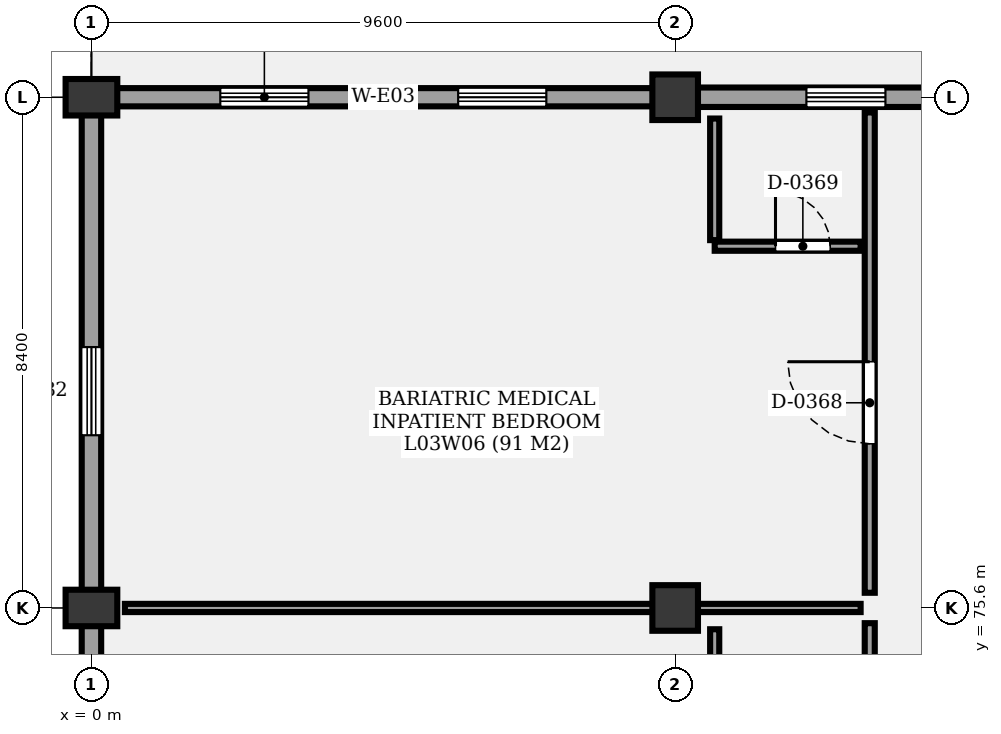
"""IFC4 building model, lengths in metres.
Left out: names, types, materials, properties, quantities, classifications, styles, units other than length and angle.
Written with IfcOpenShell. Run it as: python <this file> out.ifc"""

import sys

from ifc_helpers import new_model, si_unit, direction, frame, frame_2d, origin, origin_2d, place, context, subcontext, project, spatial, rectangle, extrude, element, fill, save


model = new_model("IFC4")
c1 = context("Model", 3, precision=1e-05, world=origin(), true_north=direction((0.0, 1.0)))
c2 = subcontext(c1, "Body", "Model", "MODEL_VIEW")
j1 = project(units=[si_unit("LENGTHUNIT", "METRE"), si_unit("PLANEANGLEUNIT", "RADIAN")], contexts=[c1])
p1 = place(None, origin())
s1 = spatial("IfcSite", under=j1, at=p1, CompositionType="ELEMENT")
p2 = place(p1, origin())
s2 = spatial("IfcBuilding", under=s1, at=p2, CompositionType="ELEMENT")
p3 = place(p2, frame((0.0, 0.0, 13.5)))
s3 = spatial("IfcBuildingStorey", under=s2, at=p3, CompositionType="ELEMENT", Elevation=13.5)
for number, where, z_axis, x_axis in (
    (1, (0.0, 75.6, 0.0), (0.0, 0.0, 1.0), (1.0, 0.0, 0.0)),
    (2, (0.0, 84.0, 0.0), (0.0, 0.0, 1.0), (1.0, 0.0, 0.0)),
):
    element("IfcColumn", number, at=place(p3, frame(where, z_axis=z_axis, x_axis=x_axis)), inside=s3, PredefinedType="COLUMN", context=c2, shape_type="SweptSolid", body=[
        extrude(rectangle(XDim=0.85, YDim=0.6, at=origin_2d()), origin(), (0.0, 0.0, 1.0), 4.3),
    ])
for number, where, z_axis, x_axis in (
    (3, (9.6, 75.6, 0.0), (0.0, 0.0, 1.0), (1.0, 0.0, 0.0)),
    (4, (9.6, 84.0, 0.0), (0.0, 0.0, 1.0), (1.0, 0.0, 0.0)),
):
    element("IfcColumn", number, at=place(p3, frame(where, z_axis=z_axis, x_axis=x_axis)), inside=s3, PredefinedType="COLUMN", context=c2, shape_type="SweptSolid", body=[
        extrude(rectangle(XDim=0.75, YDim=0.75, at=origin_2d()), origin(), (0.0, 0.0, 1.0), 4.3),
    ])
p4 = place(p3, frame((0.0, 84.0, 0.0), z_axis=(0.0, 0.0, 1.0), x_axis=(1.0, 0.0, 0.0)))
e5 = element("IfcWall", 5, at=p4, inside=s3, PredefinedType="SOLIDWALL", context=c2, shape_type="SweptSolid", body=[
    extrude(rectangle(XDim=9.6, YDim=0.3, at=frame_2d((4.8, 0.0))), origin(), (0.0, 0.0, 1.0), 3.49),
])
p5 = place(p4, frame((2.119, 0.0, 0.85)))
e6 = element("IfcOpeningElement", 6, at=p5, cuts=e5, PredefinedType="OPENING", context=c2, shape_type="SweptSolid", body=[
    extrude(rectangle(XDim=1.45, YDim=1.2, at=frame_2d((0.725, 0.6))), frame((0.0, 0.16, 0.0), z_axis=(0.0, -1.0, 0.0), x_axis=(1.0, 0.0, 0.0)), (0.0, 0.0, 1.0), 0.32),
])
p6 = place(p4, frame((6.031, 0.0, 0.85)))
e7 = element("IfcOpeningElement", 7, at=p6, cuts=e5, PredefinedType="OPENING", context=c2, shape_type="SweptSolid", body=[
    extrude(rectangle(XDim=1.45, YDim=1.2, at=frame_2d((0.725, 0.6))), frame((0.0, 0.16, 0.0), z_axis=(0.0, -1.0, 0.0), x_axis=(1.0, 0.0, 0.0)), (0.0, 0.0, 1.0), 0.32),
])
p7 = place(p3, frame((9.6, 84.0, 0.0), z_axis=(0.0, 0.0, 1.0), x_axis=(1.0, 0.0, 0.0)))
e8 = element("IfcWall", 8, at=p7, inside=s3, PredefinedType="SOLIDWALL", context=c2, shape_type="SweptSolid", body=[
    extrude(rectangle(XDim=9.6, YDim=0.32, at=frame_2d((4.8, 0.0))), origin(), (0.0, 0.0, 1.0), 3.49),
])
p8 = place(p7, frame((2.158, 0.0, 0.85)))
e9 = element("IfcOpeningElement", 9, at=p8, cuts=e8, PredefinedType="OPENING", context=c2, shape_type="SweptSolid", body=[
    extrude(rectangle(XDim=1.3, YDim=1.2, at=frame_2d((0.65, 0.6))), frame((0.0, 0.17, 0.0), z_axis=(0.0, -1.0, 0.0), x_axis=(1.0, 0.0, 0.0)), (0.0, 0.0, 1.0), 0.34),
])
p9 = place(p7, frame((6.142, 0.0, 0.85)))
e10 = element("IfcOpeningElement", 10, at=p9, cuts=e8, PredefinedType="OPENING", context=c2, shape_type="SweptSolid", body=[
    extrude(rectangle(XDim=1.3, YDim=1.2, at=frame_2d((0.65, 0.6))), frame((0.0, 0.17, 0.0), z_axis=(0.0, -1.0, 0.0), x_axis=(1.0, 0.0, 0.0)), (0.0, 0.0, 1.0), 0.34),
])
p10 = place(p3, frame((0.0, 67.2, 0.0), z_axis=(0.0, 0.0, 1.0), x_axis=(0.0, 1.0, 0.0)))
e11 = element("IfcWall", 11, at=p10, inside=s3, PredefinedType="SOLIDWALL", context=c2, shape_type="SweptSolid", body=[
    extrude(rectangle(XDim=16.64, YDim=0.32, at=frame_2d((8.32, 0.0))), origin(), (0.0, 0.0, 1.0), 3.49),
])
p11 = place(p10, frame((3.949, 0.0, 0.85)))
e12 = element("IfcOpeningElement", 12, at=p11, cuts=e11, PredefinedType="OPENING", context=c2, shape_type="SweptSolid", body=[
    extrude(rectangle(XDim=1.45, YDim=1.2, at=frame_2d((0.725, 0.6))), frame((0.0, 0.17, 0.0), z_axis=(0.0, -1.0, 0.0), x_axis=(1.0, 0.0, 0.0)), (0.0, 0.0, 1.0), 0.34),
])
p12 = place(p10, frame((11.241, 0.0, 0.85)))
e13 = element("IfcOpeningElement", 13, at=p12, cuts=e11, PredefinedType="OPENING", context=c2, shape_type="SweptSolid", body=[
    extrude(rectangle(XDim=1.45, YDim=1.2, at=frame_2d((0.725, 0.6))), frame((0.0, 0.17, 0.0), z_axis=(0.0, -1.0, 0.0), x_axis=(1.0, 0.0, 0.0)), (0.0, 0.0, 1.0), 0.34),
])
p13 = place(p3, frame((12.8, 67.45, 0.0), z_axis=(0.0, 0.0, 1.0), x_axis=(0.0, 1.0, 0.0)))
e14 = element("IfcWall", 14, at=p13, inside=s3, PredefinedType="PARTITIONING", context=c2, shape_type="SweptSolid", body=[
    extrude(rectangle(XDim=7.9, YDim=0.165, at=frame_2d((3.95, 0.0))), origin(), (0.0, 0.0, 1.0), 3.4),
])
p14 = place(p13, frame((2.45, 0.0, 0.0)))
e15 = element("IfcOpeningElement", 15, at=p14, cuts=e14, PredefinedType="OPENING", context=c2, shape_type="SweptSolid", body=[
    extrude(rectangle(XDim=1.25, YDim=2.2, at=frame_2d((0.625, 1.1))), frame((0.0, 0.093, 0.0), z_axis=(0.0, -1.0, 0.0), x_axis=(1.0, 0.0, 0.0)), (0.0, 0.0, 1.0), 0.185),
])
p15 = place(p3, frame((10.25, 73.25, 0.0), z_axis=(0.0, 0.0, 1.0), x_axis=(0.0, 1.0, 0.0)))
e16 = element("IfcWall", 16, at=p15, inside=s3, PredefinedType="PARTITIONING", context=c2, shape_type="SweptSolid", body=[
    extrude(rectangle(XDim=2.0, YDim=0.15, at=frame_2d((1.0, 0.0))), origin(), (0.0, 0.0, 1.0), 3.4),
])
p16 = place(p3, frame((12.8, 75.85, 0.0), z_axis=(0.0, 0.0, 1.0), x_axis=(0.0, 1.0, 0.0)))
e17 = element("IfcWall", 17, at=p16, inside=s3, PredefinedType="PARTITIONING", context=c2, shape_type="SweptSolid", body=[
    extrude(rectangle(XDim=7.9, YDim=0.165, at=frame_2d((3.95, 0.0))), origin(), (0.0, 0.0, 1.0), 3.4),
])
p17 = place(p16, frame((2.45, 0.0, 0.0)))
e18 = element("IfcOpeningElement", 18, at=p17, cuts=e17, PredefinedType="OPENING", context=c2, shape_type="SweptSolid", body=[
    extrude(rectangle(XDim=1.35, YDim=2.4, at=frame_2d((0.675, 1.2))), frame((0.0, 0.093, 0.0), z_axis=(0.0, -1.0, 0.0), x_axis=(1.0, 0.0, 0.0)), (0.0, 0.0, 1.0), 0.185),
])
p18 = place(p3, frame((10.25, 81.55, 0.0), z_axis=(0.0, 0.0, 1.0), x_axis=(1.0, 0.0, 0.0)))
e19 = element("IfcWall", 19, at=p18, inside=s3, PredefinedType="PARTITIONING", context=c2, shape_type="SweptSolid", body=[
    extrude(rectangle(XDim=2.4, YDim=0.15, at=frame_2d((1.2, 0.0))), origin(), (0.0, 0.0, 1.0), 3.4),
])
p19 = place(p18, frame((1.0, 0.0, 0.0)))
e20 = element("IfcOpeningElement", 20, at=p19, cuts=e19, PredefinedType="OPENING", context=c2, shape_type="SweptSolid", body=[
    extrude(rectangle(XDim=0.9, YDim=2.1, at=frame_2d((0.45, 1.05))), frame((0.0, 0.085, 0.0), z_axis=(0.0, -1.0, 0.0), x_axis=(1.0, 0.0, 0.0)), (0.0, 0.0, 1.0), 0.17),
])
p20 = place(p3, frame((10.25, 81.65, 0.0), z_axis=(0.0, 0.0, 1.0), x_axis=(0.0, 1.0, 0.0)))
e21 = element("IfcWall", 21, at=p20, inside=s3, PredefinedType="PARTITIONING", context=c2, shape_type="SweptSolid", body=[
    extrude(rectangle(XDim=2.0, YDim=0.15, at=frame_2d((1.0, 0.0))), origin(), (0.0, 0.0, 1.0), 3.4),
])
p21 = place(p3, frame((0.55, 75.6, 0.0), z_axis=(0.0, 0.0, 1.0), x_axis=(1.0, 0.0, 0.0)))
e22 = element("IfcWall", 22, at=p21, inside=s3, PredefinedType="PARTITIONING", context=c2, shape_type="SweptSolid", body=[
    extrude(rectangle(XDim=12.1, YDim=0.135, at=frame_2d((6.05, 0.0))), origin(), (0.0, 0.0, 1.0), 3.4),
])
p22 = place(p5, origin())
e23 = element("IfcWindow", 23, at=p22, inside=s3, PartitioningType="SINGLE_PANEL", PredefinedType="WINDOW", context=c2, shape_type="SweptSolid", body=[
    extrude(rectangle(XDim=1.45, YDim=1.2, at=frame_2d((0.725, 0.6))), frame((0.0, 0.03, 0.0), z_axis=(0.0, -1.0, 0.0), x_axis=(1.0, 0.0, 0.0)), (0.0, 0.0, 1.0), 0.06),
])
fill(e6, e23)
p23 = place(p6, origin())
e24 = element("IfcWindow", 24, at=p23, inside=s3, PartitioningType="SINGLE_PANEL", PredefinedType="WINDOW", context=c2, shape_type="SweptSolid", body=[
    extrude(rectangle(XDim=1.45, YDim=1.2, at=frame_2d((0.725, 0.6))), frame((0.0, 0.03, 0.0), z_axis=(0.0, -1.0, 0.0), x_axis=(1.0, 0.0, 0.0)), (0.0, 0.0, 1.0), 0.06),
])
fill(e7, e24)
p24 = place(p8, origin())
e25 = element("IfcWindow", 25, at=p24, inside=s3, PartitioningType="SINGLE_PANEL", PredefinedType="WINDOW", context=c2, shape_type="SweptSolid", body=[
    extrude(rectangle(XDim=1.3, YDim=1.2, at=frame_2d((0.65, 0.6))), frame((0.0, 0.03, 0.0), z_axis=(0.0, -1.0, 0.0), x_axis=(1.0, 0.0, 0.0)), (0.0, 0.0, 1.0), 0.06),
])
fill(e9, e25)
p25 = place(p12, origin())
e26 = element("IfcWindow", 26, at=p25, inside=s3, PartitioningType="SINGLE_PANEL", PredefinedType="WINDOW", context=c2, shape_type="SweptSolid", body=[
    extrude(rectangle(XDim=1.45, YDim=1.2, at=frame_2d((0.725, 0.6))), frame((0.0, 0.03, 0.0), z_axis=(0.0, -1.0, 0.0), x_axis=(1.0, 0.0, 0.0)), (0.0, 0.0, 1.0), 0.06),
])
fill(e13, e26)
p26 = place(p17, origin())
e27 = element("IfcDoor", 27, at=p26, inside=s3, OperationType="SINGLE_SWING_RIGHT", PredefinedType="DOOR", context=c2, shape_type="SweptSolid", body=[
    extrude(rectangle(XDim=1.35, YDim=2.4, at=frame_2d((0.675, 1.2))), frame((0.0, 0.025, 0.0), z_axis=(0.0, -1.0, 0.0), x_axis=(1.0, 0.0, 0.0)), (0.0, 0.0, 1.0), 0.05),
])
fill(e18, e27)
p27 = place(p19, origin())
e28 = element("IfcDoor", 28, at=p27, inside=s3, OperationType="SINGLE_SWING_LEFT", PredefinedType="DOOR", context=c2, shape_type="SweptSolid", body=[
    extrude(rectangle(XDim=0.9, YDim=2.1, at=frame_2d((0.45, 1.05))), frame((0.0, 0.025, 0.0), z_axis=(0.0, -1.0, 0.0), x_axis=(1.0, 0.0, 0.0)), (0.0, 0.0, 1.0), 0.05),
])
fill(e20, e28)
save(model, sys.argv[1])
